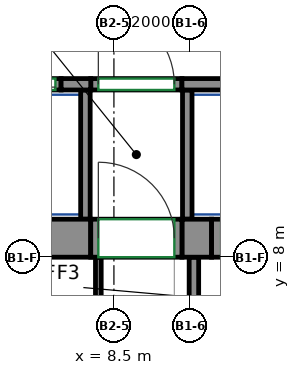
"""IFC4 building model, lengths in metres.
Left out: names, types, materials, properties, quantities, classifications, styles, units other than length and angle.
Written with IfcOpenShell. Run it as: python <this file> out.ifc"""

import sys

from ifc_helpers import new_model, si_unit, direction, frame, frame_2d, origin, place, context, subcontext, project, spatial, rectangle, extrude, source, transform, mapped, element, fill, save


model = new_model("IFC4")
c1 = context("Model", 3, precision=1e-05, world=origin(), true_north=direction((0.0, 1.0)))
c2 = subcontext(c1, "Body", "Model", "MODEL_VIEW")
j1 = project(units=[si_unit("LENGTHUNIT", "METRE"), si_unit("PLANEANGLEUNIT", "RADIAN")], contexts=[c1])
p1 = place(None, origin())
s1 = spatial("IfcSite", under=j1, at=p1, CompositionType="ELEMENT")
p2 = place(p1, origin())
s2 = spatial("IfcBuilding", under=s1, at=p2, CompositionType="ELEMENT")
p3 = place(p2, frame((0.0, 0.0, 75.2)))
s3 = spatial("IfcBuildingStorey", under=s2, at=p3, CompositionType="ELEMENT", Elevation=75.2)
m1 = source(origin(), c2, "Body", "SweptSolid", [
    extrude(rectangle(XDim=14.18, YDim=1.0, at=frame_2d((7.09, 0.0))), origin(), (0.0, 0.0, 1.0), 3.72),
])
p4 = place(p3, frame((-6.29, 8.5, 0.0), z_axis=(0.0, 0.0, 1.0), x_axis=(1.0, 0.0, 0.0)))
e1 = element("IfcWall", 1, at=p4, inside=s3, PredefinedType="SHEAR", context=c2, shape_type="MappedRepresentation", body=[
    mapped(m1, transform((0.0, 0.0, 0.0))),
])
m2 = source(origin(), c2, "Body", "SweptSolid", [
    extrude(rectangle(XDim=0.78, YDim=1.0, at=frame_2d((0.39, 0.0))), origin(), (0.0, 0.0, 1.0), 3.72),
])
p5 = place(p3, frame((10.29, 8.5, 0.0), z_axis=(0.0, 0.0, 1.0), x_axis=(1.0, 0.0, 0.0)))
e2 = element("IfcWall", 2, at=p5, inside=s3, PredefinedType="SHEAR", context=c2, shape_type="MappedRepresentation", body=[
    mapped(m2, transform((0.0, 0.0, 0.0))),
])
m3 = source(origin(), c2, "Body", "SweptSolid", [
    extrude(rectangle(XDim=0.78, YDim=0.3, at=frame_2d((0.39, 0.0))), origin(), (0.0, 0.0, 1.0), 3.72),
])
p6 = place(p3, frame((7.11, 12.55, 0.0), z_axis=(0.0, 0.0, 1.0), x_axis=(1.0, 0.0, 0.0)))
e3 = element("IfcWall", 3, at=p6, inside=s3, PredefinedType="SHEAR", context=c2, shape_type="MappedRepresentation", body=[
    mapped(m3, transform((0.0, 0.0, 0.0))),
])
m4 = source(origin(), c2, "Body", "SweptSolid", [
    extrude(rectangle(XDim=2.82, YDim=0.3, at=frame_2d((1.41, 0.0))), origin(), (0.0, 0.0, 1.0), 3.72),
])
p7 = place(p3, frame((10.29, 12.55, 0.0), z_axis=(0.0, 0.0, 1.0), x_axis=(1.0, 0.0, 0.0)))
e4 = element("IfcWall", 4, at=p7, inside=s3, PredefinedType="SHEAR", context=c2, shape_type="MappedRepresentation", body=[
    mapped(m4, transform((0.0, 0.0, 0.0))),
])
m5 = source(origin(), c2, "Body", "SweptSolid", [
    extrude(rectangle(XDim=1.4, YDim=0.3, at=frame_2d((0.7, 0.0))), origin(), (0.0, 0.0, 1.0), 3.72),
])
p8 = place(p3, frame((5.71, 12.55, 0.0), z_axis=(0.0, 0.0, 1.0), x_axis=(1.0, 0.0, 0.0)))
e5 = element("IfcWall", 5, at=p8, inside=s3, PredefinedType="PARTITIONING", context=c2, shape_type="MappedRepresentation", body=[
    mapped(m5, transform((0.0, 0.0, 0.0))),
])
p9 = place(p8, frame((0.15, 0.0, 0.0)))
e6 = element("IfcOpeningElement", 6, at=p9, cuts=e5, PredefinedType="OPENING", context=c2, shape_type="SweptSolid", body=[
    extrude(rectangle(XDim=1.1, YDim=2.1, at=frame_2d((0.55, 1.05))), frame((0.0, 0.16, 0.0), z_axis=(0.0, -1.0, 0.0), x_axis=(1.0, 0.0, 0.0)), (0.0, 0.0, 1.0), 0.32),
])
m6 = source(origin(), c2, "Body", "SweptSolid", [
    extrude(rectangle(XDim=2.4, YDim=0.3, at=frame_2d((1.2, 0.0))), origin(), (0.0, 0.0, 1.0), 3.72),
])
p10 = place(p3, frame((7.89, 12.55, 0.0), z_axis=(0.0, 0.0, 1.0), x_axis=(1.0, 0.0, 0.0)))
e7 = element("IfcWall", 7, at=p10, inside=s3, PredefinedType="PARTITIONING", context=c2, shape_type="MappedRepresentation", body=[
    mapped(m6, transform((0.0, 0.0, 0.0))),
])
p11 = place(p10, frame((0.2, 0.0, 0.0)))
e8 = element("IfcOpeningElement", 8, at=p11, cuts=e7, PredefinedType="OPENING", context=c2, shape_type="SweptSolid", body=[
    extrude(rectangle(XDim=2.0, YDim=2.1, at=frame_2d((1.0, 1.05))), frame((0.0, 0.16, 0.0), z_axis=(0.0, -1.0, 0.0), x_axis=(1.0, 0.0, 0.0)), (0.0, 0.0, 1.0), 0.32),
])
m7 = source(origin(), c2, "Body", "SweptSolid", [
    extrude(rectangle(XDim=2.65, YDim=0.25, at=frame_2d((1.325, 0.0))), origin(), (0.0, 0.0, 1.0), 3.72),
])
p12 = place(p3, frame((10.605, 5.35, 0.0), z_axis=(0.0, 0.0, 1.0), x_axis=(0.0, 1.0, 0.0)))
e9 = element("IfcWall", 9, at=p12, inside=s3, PredefinedType="PARTITIONING", context=c2, shape_type="MappedRepresentation", body=[
    mapped(m7, transform((0.0, 0.0, 0.0))),
])
m8 = source(origin(), c2, "Body", "SweptSolid", [
    extrude(rectangle(XDim=3.4, YDim=0.25, at=frame_2d((1.7, 0.0))), origin(), (0.0, 0.0, 1.0), 3.72),
])
for number, where, z_axis, x_axis in (
    (10, (10.43, 9.0, 0.0), (0.0, 0.0, 1.0), (0.0, 1.0, 0.0)),
    (11, (7.75, 9.0, 0.0), (0.0, 0.0, 1.0), (0.0, 1.0, 0.0)),
):
    element("IfcWall", number, at=place(p3, frame(where, z_axis=z_axis, x_axis=x_axis)), inside=s3, PredefinedType="PARTITIONING", context=c2, shape_type="MappedRepresentation", body=[
        mapped(m8, transform((0.0, 0.0, 0.0))),
    ])
m9 = source(origin(), c2, "Body", "SweptSolid", [
    extrude(rectangle(XDim=2.4, YDim=1.0, at=frame_2d((1.2, 0.0))), origin(), (0.0, 0.0, 1.0), 2.7),
])
p13 = place(p3, frame((7.89, 8.5, 0.0), z_axis=(0.0, 0.0, 1.0), x_axis=(1.0, 0.0, 0.0)))
e12 = element("IfcWall", 12, at=p13, inside=s3, PredefinedType="PARTITIONING", context=c2, shape_type="MappedRepresentation", body=[
    mapped(m9, transform((0.0, 0.0, 0.0))),
])
p14 = place(p13, frame((0.2, 0.0, 0.0)))
e13 = element("IfcOpeningElement", 13, at=p14, cuts=e12, PredefinedType="OPENING", context=c2, shape_type="SweptSolid", body=[
    extrude(rectangle(XDim=2.0, YDim=2.1, at=frame_2d((1.0, 1.05))), frame((0.0, 0.51, 0.0), z_axis=(0.0, -1.0, 0.0), x_axis=(1.0, 0.0, 0.0)), (0.0, 0.0, 1.0), 1.02),
])
m10 = source(origin(), c2, "Body", "SweptSolid", [
    extrude(rectangle(XDim=1.4, YDim=1.0, at=frame_2d((0.7, 0.0))), origin(), (0.0, 0.0, 1.0), 2.7),
])
p15 = place(p3, frame((11.07, 8.5, 0.0), z_axis=(0.0, 0.0, 1.0), x_axis=(1.0, 0.0, 0.0)))
e14 = element("IfcWall", 14, at=p15, inside=s3, PredefinedType="PARTITIONING", context=c2, shape_type="MappedRepresentation", body=[
    mapped(m10, transform((0.0, 0.0, 0.0))),
])
p16 = place(p15, frame((0.25, 0.0, 0.0)))
e15 = element("IfcOpeningElement", 15, at=p16, cuts=e14, PredefinedType="OPENING", context=c2, shape_type="SweptSolid", body=[
    extrude(rectangle(XDim=0.9, YDim=2.1, at=frame_2d((0.45, 1.05))), frame((0.0, 0.51, 0.0), z_axis=(0.0, -1.0, 0.0), x_axis=(1.0, 0.0, 0.0)), (0.0, 0.0, 1.0), 1.02),
])
p17 = place(p3, frame((8.09, 8.0, 0.0), z_axis=(0.0, 0.0, 1.0), x_axis=(0.0, -1.0, 0.0)))
e16 = element("IfcWall", 16, at=p17, inside=s3, PredefinedType="PARTITIONING", context=c2, shape_type="SweptSolid", body=[
    extrude(rectangle(XDim=3.225, YDim=0.15, at=frame_2d((1.613, 0.0))), origin(), (0.0, 0.0, 1.0), 3.72),
])
p18 = place(p11, origin())
e17 = element("IfcDoor", 17, at=p18, inside=s3, OperationType="DOUBLE_DOOR_SINGLE_SWING", PredefinedType="DOOR", context=c2, shape_type="SweptSolid", body=[
    extrude(rectangle(XDim=2.0, YDim=2.1, at=frame_2d((1.0, 1.05))), frame((0.0, 0.025, 0.0), z_axis=(0.0, -1.0, 0.0), x_axis=(1.0, 0.0, 0.0)), (0.0, 0.0, 1.0), 0.05),
])
fill(e8, e17)
p19 = place(p14, origin())
e18 = element("IfcDoor", 18, at=p19, inside=s3, OperationType="DOUBLE_DOOR_SINGLE_SWING", PredefinedType="DOOR", context=c2, shape_type="SweptSolid", body=[
    extrude(rectangle(XDim=2.0, YDim=2.1, at=frame_2d((1.0, 1.05))), frame((0.0, 0.405, 0.0), z_axis=(0.0, -1.0, 0.0), x_axis=(1.0, 0.0, 0.0)), (0.0, 0.0, 1.0), 0.05),
])
fill(e13, e18)
p20 = place(p9, origin())
e19 = element("IfcDoor", 19, at=p20, inside=s3, OperationType="DOUBLE_DOOR_SLIDING", PredefinedType="DOOR", context=c2, shape_type="SweptSolid", body=[
    extrude(rectangle(XDim=1.1, YDim=2.1, at=frame_2d((0.55, 1.05))), frame((0.0, 0.025, 0.0), z_axis=(0.0, -1.0, 0.0), x_axis=(1.0, 0.0, 0.0)), (0.0, 0.0, 1.0), 0.05),
])
fill(e6, e19)
save(model, sys.argv[1])
